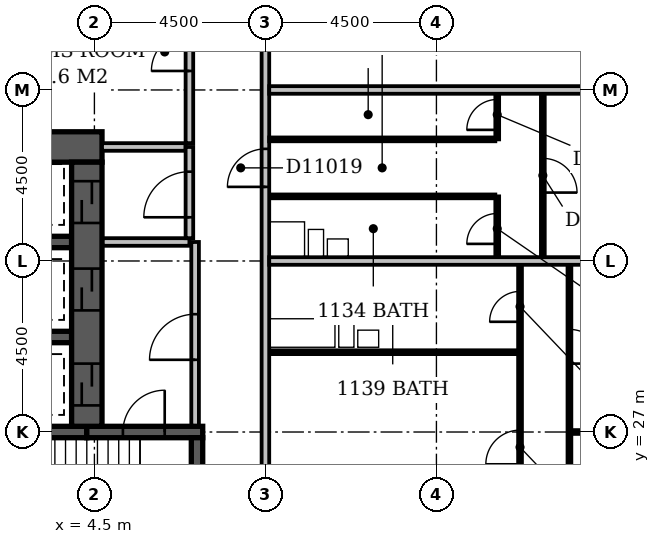
"""IFC4 building model, lengths in metres.
Left out: names, types, materials, properties, quantities, classifications, styles, units other than length and angle.
Written with IfcOpenShell. Run it as: python <this file> out.ifc"""

import sys

from ifc_helpers import new_model, si_unit, direction, frame, frame_2d, origin, place, context, subcontext, project, spatial, rectangle, extrude, element, fill, save


model = new_model("IFC4")
c1 = context("Model", 3, precision=1e-05, world=origin(), true_north=direction((0.0, 1.0)))
c2 = subcontext(c1, "Body", "Model", "MODEL_VIEW")
j1 = project(units=[si_unit("LENGTHUNIT", "METRE"), si_unit("PLANEANGLEUNIT", "RADIAN")], contexts=[c1])
p1 = place(None, origin())
s1 = spatial("IfcSite", under=j1, at=p1, CompositionType="ELEMENT")
p2 = place(p1, origin())
s2 = spatial("IfcBuilding", under=s1, at=p2, CompositionType="ELEMENT")
p3 = place(p2, frame((0.0, 0.0, 50.6)))
s3 = spatial("IfcBuildingStorey", under=s2, at=p3, CompositionType="ELEMENT", Elevation=50.6)
p4 = place(p3, frame((0.1, 34.5, -0.3), z_axis=(0.0, 0.0, 1.0), x_axis=(1.0, 0.0, 0.0)))
e1 = element("IfcWall", 1, at=p4, inside=s3, PredefinedType="SHEAR", context=c2, shape_type="SweptSolid", body=[
    extrude(rectangle(XDim=4.6, YDim=0.8, at=frame_2d((2.3, 0.0))), origin(), (0.0, 0.0, 1.0), 3.6),
])
p5 = place(p3, frame((0.35, 27.0, -0.3), z_axis=(0.0, 0.0, 1.0), x_axis=(1.0, 0.0, 0.0)))
e2 = element("IfcWall", 2, at=p5, inside=s3, PredefinedType="SHEAR", context=c2, shape_type="SweptSolid", body=[
    extrude(rectangle(XDim=3.95, YDim=0.3, at=frame_2d((1.975, 0.0))), origin(), (0.0, 0.0, 1.0), 3.6),
])
for number, where, z_axis, x_axis in (
    (3, (0.9, 29.5, -0.3), (0.0, 0.0, 1.0), (1.0, 0.0, 0.0)),
    (4, (0.9, 32.0, -0.3), (0.0, 0.0, 1.0), (1.0, 0.0, 0.0)),
):
    element("IfcWall", number, at=place(p3, frame(where, z_axis=z_axis, x_axis=x_axis)), inside=s3, PredefinedType="SHEAR", context=c2, shape_type="SweptSolid", body=[
        extrude(rectangle(XDim=3.0, YDim=0.3, at=frame_2d((1.5, 0.0))), origin(), (0.0, 0.0, 1.0), 3.6),
    ])
p6 = place(p3, frame((4.3, 27.0, -0.3), z_axis=(0.0, 0.0, 1.0), x_axis=(1.0, 0.0, 0.0)))
e5 = element("IfcWall", 5, at=p6, inside=s3, PredefinedType="SHEAR", context=c2, shape_type="SweptSolid", body=[
    extrude(rectangle(XDim=3.05, YDim=0.3, at=frame_2d((1.525, 0.0))), origin(), (0.0, 0.0, 1.0), 3.6),
])
p7 = place(p6, frame((0.95, 0.0, 0.3)))
e6 = element("IfcOpeningElement", 6, at=p7, cuts=e5, PredefinedType="OPENING", context=c2, shape_type="SweptSolid", body=[
    extrude(rectangle(XDim=1.1, YDim=2.1, at=frame_2d((0.55, 1.05))), frame((0.0, 0.162, 0.0), z_axis=(0.0, -1.0, 0.0), x_axis=(1.0, 0.0, 0.0)), (0.0, 0.0, 1.0), 0.324),
])
p8 = place(p3, frame((4.3, 27.15, -0.3), z_axis=(0.0, 0.0, 1.0), x_axis=(0.0, 1.0, 0.0)))
e7 = element("IfcWall", 7, at=p8, inside=s3, PredefinedType="SHEAR", context=c2, shape_type="SweptSolid", body=[
    extrude(rectangle(XDim=6.95, YDim=0.8, at=frame_2d((3.475, 0.0))), origin(), (0.0, 0.0, 1.0), 3.6),
])
p9 = place(p8, frame((3.05, 0.0, 0.3)))
e8 = element("IfcOpeningElement", 8, at=p9, cuts=e7, PredefinedType="OPENING", context=c2, shape_type="SweptSolid", body=[
    extrude(rectangle(XDim=1.1, YDim=2.1, at=frame_2d((0.55, 1.05))), frame((0.0, 0.412, 0.0), z_axis=(0.0, -1.0, 0.0), x_axis=(1.0, 0.0, 0.0)), (0.0, 0.0, 1.0), 0.824),
])
p10 = place(p8, frame((0.55, 0.0, 0.3)))
e9 = element("IfcOpeningElement", 9, at=p10, cuts=e7, PredefinedType="OPENING", context=c2, shape_type="SweptSolid", body=[
    extrude(rectangle(XDim=1.1, YDim=2.1, at=frame_2d((0.55, 1.05))), frame((0.0, 0.412, 0.0), z_axis=(0.0, -1.0, 0.0), x_axis=(1.0, 0.0, 0.0)), (0.0, 0.0, 1.0), 0.824),
])
p11 = place(p8, frame((5.35, 0.0, 0.3)))
e10 = element("IfcOpeningElement", 10, at=p11, cuts=e7, PredefinedType="OPENING", context=c2, shape_type="SweptSolid", body=[
    extrude(rectangle(XDim=1.1, YDim=2.1, at=frame_2d((0.55, 1.05))), frame((0.0, 0.412, 0.0), z_axis=(0.0, -1.0, 0.0), x_axis=(1.0, 0.0, 0.0)), (0.0, 0.0, 1.0), 0.824),
])
p12 = place(p3, frame((7.2, 22.65, -0.3), z_axis=(0.0, 0.0, 1.0), x_axis=(0.0, 1.0, 0.0)))
e11 = element("IfcWall", 11, at=p12, inside=s3, PredefinedType="SHEAR", context=c2, shape_type="SweptSolid", body=[
    extrude(rectangle(XDim=4.2, YDim=0.3, at=frame_2d((2.1, 0.0))), origin(), (0.0, 0.0, 1.0), 3.6),
])
p13 = place(p12, frame((0.8, 0.0, 0.3)))
e12 = element("IfcOpeningElement", 12, at=p13, cuts=e11, PredefinedType="OPENING", context=c2, shape_type="SweptSolid", body=[
    extrude(rectangle(XDim=1.1, YDim=2.1, at=frame_2d((0.55, 1.05))), frame((0.0, 0.162, 0.0), z_axis=(0.0, -1.0, 0.0), x_axis=(1.0, 0.0, 0.0)), (0.0, 0.0, 1.0), 0.324),
])
p14 = place(p3, frame((4.72, 32.0, 0.0), z_axis=(0.0, 0.0, 1.0), x_axis=(1.0, 0.0, 0.0)))
e13 = element("IfcWall", 13, at=p14, inside=s3, PredefinedType="PARTITIONING", context=c2, shape_type="SweptSolid", body=[
    extrude(rectangle(XDim=2.28, YDim=0.2, at=frame_2d((1.14, 0.0))), origin(), (0.0, 0.0, 1.0), 3.3),
])
p15 = place(p3, frame((7.0, 32.1, 0.0), z_axis=(0.0, 0.0, 1.0), x_axis=(0.0, 1.0, 0.0)))
e14 = element("IfcWall", 14, at=p15, inside=s3, PredefinedType="PARTITIONING", context=c2, shape_type="SweptSolid", body=[
    extrude(rectangle(XDim=2.4, YDim=0.2, at=frame_2d((1.2, 0.0))), origin(), (0.0, 0.0, 1.0), 3.3),
])
p16 = place(p15, frame((0.55, 0.0, 0.0)))
e15 = element("IfcOpeningElement", 15, at=p16, cuts=e14, PredefinedType="OPENING", context=c2, shape_type="SweptSolid", body=[
    extrude(rectangle(XDim=1.2, YDim=2.1, at=frame_2d((0.6, 1.05))), frame((0.0, 0.112, 0.0), z_axis=(0.0, -1.0, 0.0), x_axis=(1.0, 0.0, 0.0)), (0.0, 0.0, 1.0), 0.224),
])
p17 = place(p3, frame((4.7, 34.5, 0.0), z_axis=(0.0, 0.0, 1.0), x_axis=(1.0, 0.0, 0.0)))
e16 = element("IfcWall", 16, at=p17, inside=s3, PredefinedType="PARTITIONING", context=c2, shape_type="SweptSolid", body=[
    extrude(rectangle(XDim=2.2, YDim=0.2, at=frame_2d((1.1, 0.0))), origin(), (0.0, 0.0, 1.0), 3.3),
])
p18 = place(p3, frame((7.15, 27.17, 0.0), z_axis=(0.0, 0.0, 1.0), x_axis=(0.0, 1.0, 0.0)))
e17 = element("IfcWall", 17, at=p18, inside=s3, PredefinedType="PARTITIONING", context=c2, shape_type="SweptSolid", body=[
    extrude(rectangle(XDim=4.83, YDim=0.2, at=frame_2d((2.415, 0.0))), origin(), (0.0, 0.0, 1.0), 3.3),
])
p19 = place(p18, frame((1.73, 0.0, 0.0)))
e18 = element("IfcOpeningElement", 18, at=p19, cuts=e17, PredefinedType="OPENING", context=c2, shape_type="SweptSolid", body=[
    extrude(rectangle(XDim=1.2, YDim=2.1, at=frame_2d((0.6, 1.05))), frame((0.0, 0.112, 0.0), z_axis=(0.0, -1.0, 0.0), x_axis=(1.0, 0.0, 0.0)), (0.0, 0.0, 1.0), 0.224),
])
p20 = place(p3, frame((9.0, 5.0, 0.0), z_axis=(0.0, 0.0, 1.0), x_axis=(0.0, 1.0, 0.0)))
e19 = element("IfcWall", 19, at=p20, inside=s3, PredefinedType="PARTITIONING", context=c2, shape_type="SweptSolid", body=[
    extrude(rectangle(XDim=44.5, YDim=0.2, at=frame_2d((22.25, 0.0))), origin(), (0.0, 0.0, 1.0), 3.3),
])
p21 = place(p20, frame((28.45, 0.0, 0.0)))
e20 = element("IfcOpeningElement", 20, at=p21, cuts=e19, PredefinedType="OPENING", context=c2, shape_type="SweptSolid", body=[
    extrude(rectangle(XDim=1.0, YDim=2.1, at=frame_2d((0.5, 1.05))), frame((0.0, 0.112, 0.0), z_axis=(0.0, -1.0, 0.0), x_axis=(1.0, 0.0, 0.0)), (0.0, 0.0, 1.0), 0.224),
])
p22 = place(p20, frame((17.8, 0.0, 0.0)))
e21 = element("IfcOpeningElement", 21, at=p22, cuts=e19, PredefinedType="OPENING", context=c2, shape_type="SweptSolid", body=[
    extrude(rectangle(XDim=1.0, YDim=2.1, at=frame_2d((0.5, 1.05))), frame((0.0, 0.112, 0.0), z_axis=(0.0, -1.0, 0.0), x_axis=(1.0, 0.0, 0.0)), (0.0, 0.0, 1.0), 0.224),
])
p23 = place(p20, frame((14.55, 0.0, 0.0)))
e22 = element("IfcOpeningElement", 22, at=p23, cuts=e19, PredefinedType="OPENING", context=c2, shape_type="SweptSolid", body=[
    extrude(rectangle(XDim=1.0, YDim=2.1, at=frame_2d((0.5, 1.05))), frame((0.0, 0.112, 0.0), z_axis=(0.0, -1.0, 0.0), x_axis=(1.0, 0.0, 0.0)), (0.0, 0.0, 1.0), 0.224),
])
p24 = place(p20, frame((11.7, 0.0, 0.0)))
e23 = element("IfcOpeningElement", 23, at=p24, cuts=e19, PredefinedType="OPENING", context=c2, shape_type="SweptSolid", body=[
    extrude(rectangle(XDim=1.0, YDim=2.1, at=frame_2d((0.5, 1.05))), frame((0.0, 0.112, 0.0), z_axis=(0.0, -1.0, 0.0), x_axis=(1.0, 0.0, 0.0)), (0.0, 0.0, 1.0), 0.224),
])
p25 = place(p20, frame((35.0, 0.0, 0.0)))
e24 = element("IfcOpeningElement", 24, at=p25, cuts=e19, PredefinedType="OPENING", context=c2, shape_type="SweptSolid", body=[
    extrude(rectangle(XDim=0.9, YDim=2.1, at=frame_2d((0.45, 1.05))), frame((0.0, 0.112, 0.0), z_axis=(0.0, -1.0, 0.0), x_axis=(1.0, 0.0, 0.0)), (0.0, 0.0, 1.0), 0.224),
])
p26 = place(p20, frame((1.5, 0.0, 0.0)))
e25 = element("IfcOpeningElement", 25, at=p26, cuts=e19, PredefinedType="OPENING", context=c2, shape_type="SweptSolid", body=[
    extrude(rectangle(XDim=0.9, YDim=2.1, at=frame_2d((0.45, 1.05))), frame((0.0, 0.112, 0.0), z_axis=(0.0, -1.0, 0.0), x_axis=(1.0, 0.0, 0.0)), (0.0, 0.0, 1.0), 0.224),
])
p27 = place(p3, frame((17.0, 22.6, 0.0), z_axis=(0.0, 0.0, 1.0), x_axis=(0.0, 1.0, 0.0)))
e26 = element("IfcWall", 26, at=p27, inside=s3, PredefinedType="PARTITIONING", context=c2, shape_type="SweptSolid", body=[
    extrude(rectangle(XDim=8.8, YDim=0.1, at=frame_2d((4.4, 0.0))), origin(), (0.0, 0.0, 1.0), 3.3),
])
p28 = place(p27, frame((1.7, 0.0, 0.0)))
e27 = element("IfcOpeningElement", 27, at=p28, cuts=e26, PredefinedType="OPENING", context=c2, shape_type="SweptSolid", body=[
    extrude(rectangle(XDim=0.9, YDim=2.1, at=frame_2d((0.45, 1.05))), frame((0.0, 0.062, 0.0), z_axis=(0.0, -1.0, 0.0), x_axis=(1.0, 0.0, 0.0)), (0.0, 0.0, 1.0), 0.124),
])
p29 = place(p27, frame((6.2, 0.0, 0.0)))
e28 = element("IfcOpeningElement", 28, at=p29, cuts=e26, PredefinedType="OPENING", context=c2, shape_type="SweptSolid", body=[
    extrude(rectangle(XDim=0.9, YDim=2.1, at=frame_2d((0.45, 1.05))), frame((0.0, 0.062, 0.0), z_axis=(0.0, -1.0, 0.0), x_axis=(1.0, 0.0, 0.0)), (0.0, 0.0, 1.0), 0.124),
])
p30 = place(p3, frame((15.7, 24.1, 0.0), z_axis=(0.0, 0.0, 1.0), x_axis=(0.0, 1.0, 0.0)))
e29 = element("IfcWall", 29, at=p30, inside=s3, PredefinedType="PARTITIONING", context=c2, shape_type="SweptSolid", body=[
    extrude(rectangle(XDim=7.3, YDim=0.1, at=frame_2d((3.65, 0.0))), origin(), (0.0, 0.0, 1.0), 3.3),
])
p31 = place(p30, frame((5.8, 0.0, 0.0)))
e30 = element("IfcOpeningElement", 30, at=p31, cuts=e29, PredefinedType="OPENING", context=c2, shape_type="SweptSolid", body=[
    extrude(rectangle(XDim=0.8, YDim=2.1, at=frame_2d((0.4, 1.05))), frame((0.0, 0.062, 0.0), z_axis=(0.0, -1.0, 0.0), x_axis=(1.0, 0.0, 0.0)), (0.0, 0.0, 1.0), 0.124),
])
p32 = place(p30, frame((2.05, 0.0, 0.0)))
e31 = element("IfcOpeningElement", 31, at=p32, cuts=e29, PredefinedType="OPENING", context=c2, shape_type="SweptSolid", body=[
    extrude(rectangle(XDim=0.9, YDim=2.1, at=frame_2d((0.45, 1.05))), frame((0.0, 0.062, 0.0), z_axis=(0.0, -1.0, 0.0), x_axis=(1.0, 0.0, 0.0)), (0.0, 0.0, 1.0), 0.124),
])
p33 = place(p3, frame((17.05, 27.0, 0.0), z_axis=(0.0, 0.0, 1.0), x_axis=(1.0, 0.0, 0.0)))
e32 = element("IfcWall", 32, at=p33, inside=s3, PredefinedType="PARTITIONING", context=c2, shape_type="SweptSolid", body=[
    extrude(rectangle(XDim=4.85, YDim=0.1, at=frame_2d((2.425, 0.0))), origin(), (0.0, 0.0, 1.0), 2.7),
])
p34 = place(p3, frame((9.1, 29.1, 0.0), z_axis=(0.0, 0.0, 1.0), x_axis=(1.0, 0.0, 0.0)))
e33 = element("IfcWall", 33, at=p34, inside=s3, PredefinedType="PLUMBINGWALL", context=c2, shape_type="SweptSolid", body=[
    extrude(rectangle(XDim=6.55, YDim=0.1, at=frame_2d((3.275, 0.0))), origin(), (0.0, 0.0, 1.0), 3.3),
])
p35 = place(p3, frame((9.1, 31.5, 0.0), z_axis=(0.0, 0.0, 1.0), x_axis=(1.0, 0.0, 0.0)))
e34 = element("IfcWall", 34, at=p35, inside=s3, PredefinedType="PARTITIONING", context=c2, shape_type="SweptSolid", body=[
    extrude(rectangle(XDim=12.8, YDim=0.2, at=frame_2d((6.4, 0.0))), origin(), (0.0, 0.0, 1.0), 3.3),
])
p36 = place(p3, frame((15.1, 31.6, 0.0), z_axis=(0.0, 0.0, 1.0), x_axis=(0.0, 1.0, 0.0)))
e35 = element("IfcWall", 35, at=p36, inside=s3, PredefinedType="PARTITIONING", context=c2, shape_type="SweptSolid", body=[
    extrude(rectangle(XDim=1.6, YDim=0.1, at=frame_2d((0.8, 0.0))), origin(), (0.0, 0.0, 1.0), 3.3),
])
p37 = place(p36, frame((0.35, 0.0, 0.0)))
e36 = element("IfcOpeningElement", 36, at=p37, cuts=e35, PredefinedType="OPENING", context=c2, shape_type="SweptSolid", body=[
    extrude(rectangle(XDim=0.8, YDim=2.1, at=frame_2d((0.4, 1.05))), frame((0.0, 0.062, 0.0), z_axis=(0.0, -1.0, 0.0), x_axis=(1.0, 0.0, 0.0)), (0.0, 0.0, 1.0), 0.124),
])
p38 = place(p3, frame((16.3, 31.6, 0.0), z_axis=(0.0, 0.0, 1.0), x_axis=(0.0, 1.0, 0.0)))
e37 = element("IfcWall", 37, at=p38, inside=s3, PredefinedType="PARTITIONING", context=c2, shape_type="SweptSolid", body=[
    extrude(rectangle(XDim=4.3, YDim=0.1, at=frame_2d((2.15, 0.0))), origin(), (0.0, 0.0, 1.0), 3.3),
])
p39 = place(p38, frame((1.7, 0.0, 0.0)))
e38 = element("IfcOpeningElement", 38, at=p39, cuts=e37, PredefinedType="OPENING", context=c2, shape_type="SweptSolid", body=[
    extrude(rectangle(XDim=0.9, YDim=2.1, at=frame_2d((0.45, 1.05))), frame((0.0, 0.062, 0.0), z_axis=(0.0, -1.0, 0.0), x_axis=(1.0, 0.0, 0.0)), (0.0, 0.0, 1.0), 0.124),
])
p40 = place(p3, frame((9.1, 33.2, 0.0), z_axis=(0.0, 0.0, 1.0), x_axis=(1.0, 0.0, 0.0)))
e39 = element("IfcWall", 39, at=p40, inside=s3, PredefinedType="PLUMBINGWALL", context=c2, shape_type="SweptSolid", body=[
    extrude(rectangle(XDim=5.95, YDim=0.1, at=frame_2d((2.975, 0.0))), origin(), (0.0, 0.0, 1.0), 3.3),
])
p41 = place(p3, frame((7.0, 34.6, 0.0), z_axis=(0.0, 0.0, 1.0), x_axis=(0.0, 1.0, 0.0)))
e40 = element("IfcWall", 40, at=p41, inside=s3, PredefinedType="PARTITIONING", context=c2, shape_type="SweptSolid", body=[
    extrude(rectangle(XDim=14.8, YDim=0.2, at=frame_2d((7.4, 0.0))), origin(), (0.0, 0.0, 1.0), 3.3),
])
p42 = place(p41, frame((1.9, 0.0, 0.0)))
e41 = element("IfcOpeningElement", 41, at=p42, cuts=e40, PredefinedType="OPENING", context=c2, shape_type="SweptSolid", body=[
    extrude(rectangle(XDim=1.0, YDim=2.1, at=frame_2d((0.5, 1.05))), frame((0.0, 0.112, 0.0), z_axis=(0.0, -1.0, 0.0), x_axis=(1.0, 0.0, 0.0)), (0.0, 0.0, 1.0), 0.224),
])
p43 = place(p41, frame((6.9, 0.0, 0.0)))
e42 = element("IfcOpeningElement", 42, at=p43, cuts=e40, PredefinedType="OPENING", context=c2, shape_type="SweptSolid", body=[
    extrude(rectangle(XDim=1.0, YDim=2.1, at=frame_2d((0.5, 1.05))), frame((0.0, 0.112, 0.0), z_axis=(0.0, -1.0, 0.0), x_axis=(1.0, 0.0, 0.0)), (0.0, 0.0, 1.0), 0.224),
])
p44 = place(p41, frame((11.95, 0.0, 0.0)))
e43 = element("IfcOpeningElement", 43, at=p44, cuts=e40, PredefinedType="OPENING", context=c2, shape_type="SweptSolid", body=[
    extrude(rectangle(XDim=0.9, YDim=2.1, at=frame_2d((0.45, 1.05))), frame((0.0, 0.112, 0.0), z_axis=(0.0, -1.0, 0.0), x_axis=(1.0, 0.0, 0.0)), (0.0, 0.0, 1.0), 0.224),
])
p45 = place(p3, frame((9.1, 34.7, 0.0), z_axis=(0.0, 0.0, 1.0), x_axis=(1.0, 0.0, 0.0)))
e44 = element("IfcWall", 44, at=p45, inside=s3, PredefinedType="PARTITIONING", context=c2, shape_type="SweptSolid", body=[
    extrude(rectangle(XDim=5.95, YDim=0.1, at=frame_2d((2.975, 0.0))), origin(), (0.0, 0.0, 1.0), 3.3),
])
p46 = place(p3, frame((15.1, 34.7, 0.0), z_axis=(0.0, 0.0, 1.0), x_axis=(0.0, 1.0, 0.0)))
e45 = element("IfcWall", 45, at=p46, inside=s3, PredefinedType="PARTITIONING", context=c2, shape_type="SweptSolid", body=[
    extrude(rectangle(XDim=1.2, YDim=0.1, at=frame_2d((0.6, 0.0))), origin(), (0.0, 0.0, 1.0), 3.3),
])
p47 = place(p46, frame((0.25, 0.0, 0.0)))
e46 = element("IfcOpeningElement", 46, at=p47, cuts=e45, PredefinedType="OPENING", context=c2, shape_type="SweptSolid", body=[
    extrude(rectangle(XDim=0.8, YDim=2.1, at=frame_2d((0.4, 1.05))), frame((0.0, 0.062, 0.0), z_axis=(0.0, -1.0, 0.0), x_axis=(1.0, 0.0, 0.0)), (0.0, 0.0, 1.0), 0.124),
])
p48 = place(p3, frame((9.1, 36.0, 0.0), z_axis=(0.0, 0.0, 1.0), x_axis=(1.0, 0.0, 0.0)))
e47 = element("IfcWall", 47, at=p48, inside=s3, PredefinedType="PARTITIONING", context=c2, shape_type="SweptSolid", body=[
    extrude(rectangle(XDim=12.8, YDim=0.2, at=frame_2d((6.4, 0.0))), origin(), (0.0, 0.0, 1.0), 2.4),
])
p49 = place(p19, origin())
e48 = element("IfcDoor", 48, at=p49, inside=s3, OperationType="SINGLE_SWING_LEFT", PredefinedType="DOOR", context=c2, shape_type="SweptSolid", body=[
    extrude(rectangle(XDim=1.2, YDim=2.1, at=frame_2d((0.6, 1.05))), frame((0.0, 0.025, 0.0), z_axis=(0.0, -1.0, 0.0), x_axis=(1.0, 0.0, 0.0)), (0.0, 0.0, 1.0), 0.05),
])
fill(e18, e48)
p50 = place(p9, origin())
e49 = element("IfcDoor", 49, at=p50, inside=s3, OperationType="SLIDING_TO_LEFT", PredefinedType="DOOR", context=c2, shape_type="SweptSolid", body=[
    extrude(rectangle(XDim=1.1, YDim=2.1, at=frame_2d((0.55, 1.05))), frame((0.0, 0.025, 0.0), z_axis=(0.0, -1.0, 0.0), x_axis=(1.0, 0.0, 0.0)), (0.0, 0.0, 1.0), 0.05),
])
fill(e8, e49)
p51 = place(p10, origin())
e50 = element("IfcDoor", 50, at=p51, inside=s3, OperationType="SLIDING_TO_LEFT", PredefinedType="DOOR", context=c2, shape_type="SweptSolid", body=[
    extrude(rectangle(XDim=1.1, YDim=2.1, at=frame_2d((0.55, 1.05))), frame((0.0, 0.025, 0.0), z_axis=(0.0, -1.0, 0.0), x_axis=(1.0, 0.0, 0.0)), (0.0, 0.0, 1.0), 0.05),
])
fill(e9, e50)
p52 = place(p16, origin())
e51 = element("IfcDoor", 51, at=p52, inside=s3, OperationType="SINGLE_SWING_LEFT", PredefinedType="DOOR", context=c2, shape_type="SweptSolid", body=[
    extrude(rectangle(XDim=1.2, YDim=2.1, at=frame_2d((0.6, 1.05))), frame((0.0, 0.025, 0.0), z_axis=(0.0, -1.0, 0.0), x_axis=(1.0, 0.0, 0.0)), (0.0, 0.0, 1.0), 0.05),
])
fill(e15, e51)
p53 = place(p11, origin())
e52 = element("IfcDoor", 52, at=p53, inside=s3, OperationType="SLIDING_TO_LEFT", PredefinedType="DOOR", context=c2, shape_type="SweptSolid", body=[
    extrude(rectangle(XDim=1.1, YDim=2.1, at=frame_2d((0.55, 1.05))), frame((0.0, 0.025, 0.0), z_axis=(0.0, -1.0, 0.0), x_axis=(1.0, 0.0, 0.0)), (0.0, 0.0, 1.0), 0.05),
])
fill(e10, e52)
p54 = place(p7, frame((1.1, 0.0, 0.0), z_axis=(0.0, 0.0, 1.0), x_axis=(-1.0, 0.0, 0.0)))
e53 = element("IfcDoor", 53, at=p54, inside=s3, OperationType="SINGLE_SWING_LEFT", PredefinedType="DOOR", context=c2, shape_type="SweptSolid", body=[
    extrude(rectangle(XDim=1.1, YDim=2.1, at=frame_2d((0.55, 1.05))), frame((0.0, 0.025, 0.0), z_axis=(0.0, -1.0, 0.0), x_axis=(1.0, 0.0, 0.0)), (0.0, 0.0, 1.0), 0.05),
])
fill(e6, e53)
p55 = place(p21, origin())
e54 = element("IfcDoor", 54, at=p55, inside=s3, OperationType="SINGLE_SWING_LEFT", PredefinedType="DOOR", context=c2, shape_type="SweptSolid", body=[
    extrude(rectangle(XDim=1.0, YDim=2.1, at=frame_2d((0.5, 1.05))), frame((0.0, 0.025, 0.0), z_axis=(0.0, -1.0, 0.0), x_axis=(1.0, 0.0, 0.0)), (0.0, 0.0, 1.0), 0.05),
])
fill(e20, e54)
p56 = place(p29, frame((0.9, 0.0, 0.0), z_axis=(0.0, 0.0, 1.0), x_axis=(-1.0, 0.0, 0.0)))
e55 = element("IfcDoor", 55, at=p56, inside=s3, OperationType="SINGLE_SWING_RIGHT", PredefinedType="DOOR", context=c2, shape_type="SweptSolid", body=[
    extrude(rectangle(XDim=0.9, YDim=2.1, at=frame_2d((0.45, 1.05))), frame((0.0, 0.025, 0.0), z_axis=(0.0, -1.0, 0.0), x_axis=(1.0, 0.0, 0.0)), (0.0, 0.0, 1.0), 0.05),
])
fill(e28, e55)
p57 = place(p31, origin())
e56 = element("IfcDoor", 56, at=p57, inside=s3, OperationType="SINGLE_SWING_LEFT", PredefinedType="DOOR", context=c2, shape_type="SweptSolid", body=[
    extrude(rectangle(XDim=0.8, YDim=2.1, at=frame_2d((0.4, 1.05))), frame((0.0, 0.025, 0.0), z_axis=(0.0, -1.0, 0.0), x_axis=(1.0, 0.0, 0.0)), (0.0, 0.0, 1.0), 0.05),
])
fill(e30, e56)
p58 = place(p32, origin())
e57 = element("IfcDoor", 57, at=p58, inside=s3, OperationType="SINGLE_SWING_LEFT", PredefinedType="DOOR", context=c2, shape_type="SweptSolid", body=[
    extrude(rectangle(XDim=0.9, YDim=2.1, at=frame_2d((0.45, 1.05))), frame((0.0, 0.025, 0.0), z_axis=(0.0, -1.0, 0.0), x_axis=(1.0, 0.0, 0.0)), (0.0, 0.0, 1.0), 0.05),
])
fill(e31, e57)
p59 = place(p37, origin())
e58 = element("IfcDoor", 58, at=p59, inside=s3, OperationType="SINGLE_SWING_LEFT", PredefinedType="DOOR", context=c2, shape_type="SweptSolid", body=[
    extrude(rectangle(XDim=0.8, YDim=2.1, at=frame_2d((0.4, 1.05))), frame((0.0, 0.025, 0.0), z_axis=(0.0, -1.0, 0.0), x_axis=(1.0, 0.0, 0.0)), (0.0, 0.0, 1.0), 0.05),
])
fill(e36, e58)
p60 = place(p39, frame((0.9, 0.0, 0.0), z_axis=(0.0, 0.0, 1.0), x_axis=(-1.0, 0.0, 0.0)))
e59 = element("IfcDoor", 59, at=p60, inside=s3, OperationType="SINGLE_SWING_RIGHT", PredefinedType="DOOR", context=c2, shape_type="SweptSolid", body=[
    extrude(rectangle(XDim=0.9, YDim=2.1, at=frame_2d((0.45, 1.05))), frame((0.0, 0.025, 0.0), z_axis=(0.0, -1.0, 0.0), x_axis=(1.0, 0.0, 0.0)), (0.0, 0.0, 1.0), 0.05),
])
fill(e38, e59)
p61 = place(p42, origin())
e60 = element("IfcDoor", 60, at=p61, inside=s3, OperationType="SINGLE_SWING_LEFT", PredefinedType="DOOR", context=c2, shape_type="SweptSolid", body=[
    extrude(rectangle(XDim=1.0, YDim=2.1, at=frame_2d((0.5, 1.05))), frame((0.0, 0.025, 0.0), z_axis=(0.0, -1.0, 0.0), x_axis=(1.0, 0.0, 0.0)), (0.0, 0.0, 1.0), 0.05),
])
fill(e41, e60)
p62 = place(p47, origin())
e61 = element("IfcDoor", 61, at=p62, inside=s3, OperationType="SINGLE_SWING_LEFT", PredefinedType="DOOR", context=c2, shape_type="SweptSolid", body=[
    extrude(rectangle(XDim=0.8, YDim=2.1, at=frame_2d((0.4, 1.05))), frame((0.0, 0.025, 0.0), z_axis=(0.0, -1.0, 0.0), x_axis=(1.0, 0.0, 0.0)), (0.0, 0.0, 1.0), 0.05),
])
fill(e46, e61)
save(model, sys.argv[1])
